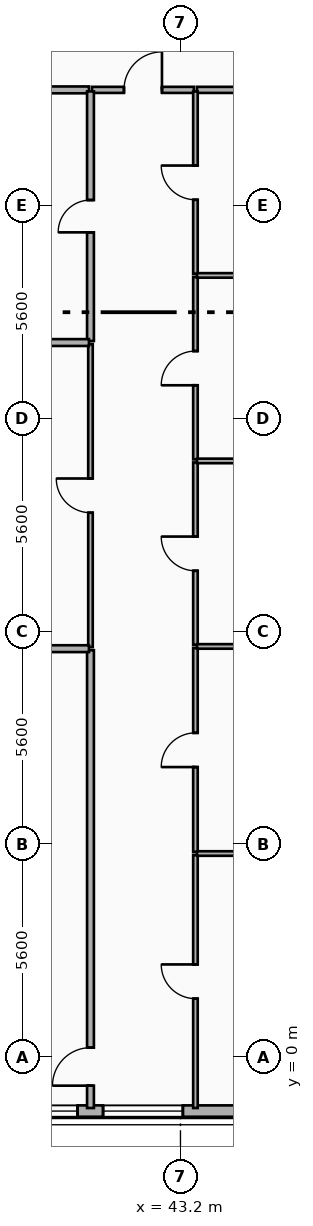
"""IFC4 building model, lengths in metres.
Left out: names, types, materials, properties, quantities, classifications, styles, units other than length and angle.
Written with IfcOpenShell. Run it as: python <this file> out.ifc"""

import sys

from ifc_helpers import new_model, si_unit, direction, frame, frame_2d, origin, place, context, subcontext, project, spatial, rectangle, extrude, element, fill, save


model = new_model("IFC4")
c1 = context("Model", 3, precision=1e-05, world=origin(), true_north=direction((0.0, 1.0)))
c2 = subcontext(c1, "Body", "Model", "MODEL_VIEW")
j1 = project(units=[si_unit("LENGTHUNIT", "METRE"), si_unit("PLANEANGLEUNIT", "RADIAN")], contexts=[c1])
p1 = place(None, origin())
s1 = spatial("IfcSite", under=j1, at=p1, CompositionType="ELEMENT")
p2 = place(p1, origin())
s2 = spatial("IfcBuilding", under=s1, at=p2, CompositionType="ELEMENT")
p3 = place(p2, frame((0.0, 0.0, 247.3)))
s3 = spatial("IfcBuildingStorey", under=s2, at=p3, CompositionType="ELEMENT", Elevation=247.3)
p4 = place(p3, frame((45.2, -1.42, 0.0), z_axis=(0.0, 0.0, 1.0), x_axis=(-1.0, 0.0, 0.0)))
e1 = element("IfcWall", 1, at=p4, inside=s3, PredefinedType="SOLIDWALL", context=c2, shape_type="SweptSolid", body=[
    extrude(rectangle(XDim=32.8, YDim=0.3, at=frame_2d((16.4, 0.0))), origin(), (0.0, 0.0, 1.0), 3.42),
])
p5 = place(p4, frame((29.071, 0.0, 0.75)))
e2 = element("IfcOpeningElement", 2, at=p5, cuts=e1, PredefinedType="OPENING", context=c2, shape_type="SweptSolid", body=[
    extrude(rectangle(XDim=2.1, YDim=2.1, at=frame_2d((1.05, 1.05))), frame((0.0, 0.16, 0.0), z_axis=(0.0, -1.0, 0.0), x_axis=(1.0, 0.0, 0.0)), (0.0, 0.0, 1.0), 0.32),
])
p6 = place(p4, frame((26.745, 0.0, 0.75)))
e3 = element("IfcOpeningElement", 3, at=p6, cuts=e1, PredefinedType="OPENING", context=c2, shape_type="SweptSolid", body=[
    extrude(rectangle(XDim=1.6, YDim=1.95, at=frame_2d((0.8, 0.975))), frame((0.0, 0.16, 0.0), z_axis=(0.0, -1.0, 0.0), x_axis=(1.0, 0.0, 0.0)), (0.0, 0.0, 1.0), 0.32),
])
p7 = place(p4, frame((21.981, 0.0, 0.75)))
e4 = element("IfcOpeningElement", 4, at=p7, cuts=e1, PredefinedType="OPENING", context=c2, shape_type="SweptSolid", body=[
    extrude(rectangle(XDim=2.1, YDim=2.1, at=frame_2d((1.05, 1.05))), frame((0.0, 0.16, 0.0), z_axis=(0.0, -1.0, 0.0), x_axis=(1.0, 0.0, 0.0)), (0.0, 0.0, 1.0), 0.32),
])
p8 = place(p4, frame((18.324, 0.0, 0.75)))
e5 = element("IfcOpeningElement", 5, at=p8, cuts=e1, PredefinedType="OPENING", context=c2, shape_type="SweptSolid", body=[
    extrude(rectangle(XDim=2.1, YDim=2.1, at=frame_2d((1.05, 1.05))), frame((0.0, 0.16, 0.0), z_axis=(0.0, -1.0, 0.0), x_axis=(1.0, 0.0, 0.0)), (0.0, 0.0, 1.0), 0.32),
])
p9 = place(p4, frame((11.364, 0.0, 0.75)))
e6 = element("IfcOpeningElement", 6, at=p9, cuts=e1, PredefinedType="OPENING", context=c2, shape_type="SweptSolid", body=[
    extrude(rectangle(XDim=2.1, YDim=2.1, at=frame_2d((1.05, 1.05))), frame((0.0, 0.16, 0.0), z_axis=(0.0, -1.0, 0.0), x_axis=(1.0, 0.0, 0.0)), (0.0, 0.0, 1.0), 0.32),
])
p10 = place(p4, frame((9.238, 0.0, 0.68)))
e7 = element("IfcOpeningElement", 7, at=p10, cuts=e1, PredefinedType="OPENING", context=c2, shape_type="SweptSolid", body=[
    extrude(rectangle(XDim=1.2, YDim=1.5, at=frame_2d((0.6, 0.75))), frame((0.0, 0.16, 0.0), z_axis=(0.0, -1.0, 0.0), x_axis=(1.0, 0.0, 0.0)), (0.0, 0.0, 1.0), 0.32),
])
p11 = place(p4, frame((14.669, 0.0, 0.75)))
e8 = element("IfcOpeningElement", 8, at=p11, cuts=e1, PredefinedType="OPENING", context=c2, shape_type="SweptSolid", body=[
    extrude(rectangle(XDim=2.1, YDim=2.1, at=frame_2d((1.05, 1.05))), frame((0.0, 0.16, 0.0), z_axis=(0.0, -1.0, 0.0), x_axis=(1.0, 0.0, 0.0)), (0.0, 0.0, 1.0), 0.32),
])
p12 = place(p4, frame((1.937, 0.0, 0.75)))
e9 = element("IfcOpeningElement", 9, at=p12, cuts=e1, PredefinedType="OPENING", context=c2, shape_type="SweptSolid", body=[
    extrude(rectangle(XDim=2.1, YDim=2.1, at=frame_2d((1.05, 1.05))), frame((0.0, 0.16, 0.0), z_axis=(0.0, -1.0, 0.0), x_axis=(1.0, 0.0, 0.0)), (0.0, 0.0, 1.0), 0.32),
])
p13 = place(p4, frame((4.709, 0.0, 0.8)))
e10 = element("IfcOpeningElement", 10, at=p13, cuts=e1, PredefinedType="OPENING", context=c2, shape_type="SweptSolid", body=[
    extrude(rectangle(XDim=1.8, YDim=1.8, at=frame_2d((0.9, 0.9))), frame((0.0, 0.16, 0.0), z_axis=(0.0, -1.0, 0.0), x_axis=(1.0, 0.0, 0.0)), (0.0, 0.0, 1.0), 0.32),
])
p14 = place(p3, frame((40.872, 25.45, 0.0), z_axis=(0.0, 0.0, 1.0), x_axis=(1.0, 0.0, 0.0)))
e11 = element("IfcWall", 11, at=p14, inside=s3, PredefinedType="PARTITIONING", context=c2, shape_type="SweptSolid", body=[
    extrude(rectangle(XDim=2.682, YDim=0.16, at=frame_2d((1.341, 0.0))), origin(), (0.0, 0.0, 1.0), 3.42),
])
p15 = place(p14, frame((0.841, 0.0, 0.0)))
e12 = element("IfcOpeningElement", 12, at=p15, cuts=e11, PredefinedType="OPENING", context=c2, shape_type="SweptSolid", body=[
    extrude(rectangle(XDim=1.0, YDim=2.15, at=frame_2d((0.5, 1.075))), frame((0.0, 0.09, 0.0), z_axis=(0.0, -1.0, 0.0), x_axis=(1.0, 0.0, 0.0)), (0.0, 0.0, 1.0), 0.18),
])
p16 = place(p3, frame((38.39, 25.45, 0.0), z_axis=(0.0, 0.0, 1.0), x_axis=(1.0, 0.0, 0.0)))
e13 = element("IfcWall", 13, at=p16, inside=s3, PredefinedType="PLUMBINGWALL", context=c2, shape_type="SweptSolid", body=[
    extrude(rectangle(XDim=2.402, YDim=0.18, at=frame_2d((1.201, 0.0))), origin(), (0.0, 0.0, 1.0), 3.42),
])
p17 = place(p3, frame((43.634, 25.45, 0.0), z_axis=(0.0, 0.0, 1.0), x_axis=(1.0, 0.0, 0.0)))
e14 = element("IfcWall", 14, at=p17, inside=s3, PredefinedType="PARTITIONING", context=c2, shape_type="SweptSolid", body=[
    extrude(rectangle(XDim=5.506, YDim=0.16, at=frame_2d((2.753, 0.0))), origin(), (0.0, 0.0, 1.0), 2.7),
])
p18 = place(p3, frame((40.832, -1.34, 0.0), z_axis=(0.0, 0.0, 1.0), x_axis=(0.0, 1.0, 0.0)))
e15 = element("IfcWall", 15, at=p18, inside=s3, PredefinedType="PLUMBINGWALL", context=c2, shape_type="SweptSolid", body=[
    extrude(rectangle(XDim=12.047, YDim=0.18, at=frame_2d((6.023, 0.0))), origin(), (0.0, 0.0, 1.0), 3.05),
])
p19 = place(p18, frame((0.589, 0.0, 0.0)))
e16 = element("IfcOpeningElement", 16, at=p19, cuts=e15, PredefinedType="OPENING", context=c2, shape_type="SweptSolid", body=[
    extrude(rectangle(XDim=1.0, YDim=2.15, at=frame_2d((0.5, 1.075))), frame((0.0, 0.1, 0.0), z_axis=(0.0, -1.0, 0.0), x_axis=(1.0, 0.0, 0.0)), (0.0, 0.0, 1.0), 0.2),
])
p20 = place(p3, frame((40.832, 10.787, 0.0), z_axis=(0.0, 0.0, 1.0), x_axis=(0.0, 1.0, 0.0)))
e17 = element("IfcWall", 17, at=p20, inside=s3, PredefinedType="PARTITIONING", context=c2, shape_type="SweptSolid", body=[
    extrude(rectangle(XDim=7.975, YDim=0.12, at=frame_2d((3.987, 0.0))), origin(), (0.0, 0.0, 1.0), 2.9),
])
p21 = place(p20, frame((3.538, 0.0, 0.0)))
e18 = element("IfcOpeningElement", 18, at=p21, cuts=e17, PredefinedType="OPENING", context=c2, shape_type="SweptSolid", body=[
    extrude(rectangle(XDim=0.9, YDim=2.1, at=frame_2d((0.45, 1.05))), frame((0.0, 0.07, 0.0), z_axis=(0.0, -1.0, 0.0), x_axis=(1.0, 0.0, 0.0)), (0.0, 0.0, 1.0), 0.14),
])
p22 = place(p3, frame((40.832, 18.842, 0.0), z_axis=(0.0, 0.0, 1.0), x_axis=(0.0, 1.0, 0.0)))
e19 = element("IfcWall", 19, at=p22, inside=s3, PredefinedType="PLUMBINGWALL", context=c2, shape_type="SweptSolid", body=[
    extrude(rectangle(XDim=6.568, YDim=0.18, at=frame_2d((3.284, 0.0))), origin(), (0.0, 0.0, 1.0), 2.9),
])
p23 = place(p22, frame((2.859, 0.0, 0.0)))
e20 = element("IfcOpeningElement", 20, at=p23, cuts=e19, PredefinedType="OPENING", context=c2, shape_type="SweptSolid", body=[
    extrude(rectangle(XDim=0.85, YDim=2.1, at=frame_2d((0.425, 1.05))), frame((0.0, 0.1, 0.0), z_axis=(0.0, -1.0, 0.0), x_axis=(1.0, 0.0, 0.0)), (0.0, 0.0, 1.0), 0.2),
])
p24 = place(p3, frame((43.594, -1.34, 0.0), z_axis=(0.0, 0.0, 1.0), x_axis=(0.0, 1.0, 0.0)))
e21 = element("IfcWall", 21, at=p24, inside=s3, PredefinedType="PARTITIONING", context=c2, shape_type="SweptSolid", body=[
    extrude(rectangle(XDim=6.657, YDim=0.12, at=frame_2d((3.329, 0.0))), origin(), (0.0, 0.0, 1.0), 3.08),
])
p25 = place(p24, frame((2.878, 0.0, 0.0)))
e22 = element("IfcOpeningElement", 22, at=p25, cuts=e21, PredefinedType="OPENING", context=c2, shape_type="SweptSolid", body=[
    extrude(rectangle(XDim=0.9, YDim=2.1, at=frame_2d((0.45, 1.05))), frame((0.0, 0.07, 0.0), z_axis=(0.0, -1.0, 0.0), x_axis=(1.0, 0.0, 0.0)), (0.0, 0.0, 1.0), 0.14),
])
p26 = place(p3, frame((43.594, 5.397, 0.0), z_axis=(0.0, 0.0, 1.0), x_axis=(0.0, 1.0, 0.0)))
e23 = element("IfcWall", 23, at=p26, inside=s3, PredefinedType="PARTITIONING", context=c2, shape_type="SweptSolid", body=[
    extrude(rectangle(XDim=5.369, YDim=0.12, at=frame_2d((2.685, 0.0))), origin(), (0.0, 0.0, 1.0), 3.05),
])
p27 = place(p26, frame((2.235, 0.0, 0.0)))
e24 = element("IfcOpeningElement", 24, at=p27, cuts=e23, PredefinedType="OPENING", context=c2, shape_type="SweptSolid", body=[
    extrude(rectangle(XDim=0.9, YDim=2.1, at=frame_2d((0.45, 1.05))), frame((0.0, 0.07, 0.0), z_axis=(0.0, -1.0, 0.0), x_axis=(1.0, 0.0, 0.0)), (0.0, 0.0, 1.0), 0.14),
])
p28 = place(p3, frame((43.594, 10.846, 0.0), z_axis=(0.0, 0.0, 1.0), x_axis=(0.0, 1.0, 0.0)))
e25 = element("IfcWall", 25, at=p28, inside=s3, PredefinedType="PARTITIONING", context=c2, shape_type="SweptSolid", body=[
    extrude(rectangle(XDim=4.801, YDim=0.12, at=frame_2d((2.4, 0.0))), origin(), (0.0, 0.0, 1.0), 2.9),
])
p29 = place(p28, frame((1.95, 0.0, 0.0)))
e26 = element("IfcOpeningElement", 26, at=p29, cuts=e25, PredefinedType="OPENING", context=c2, shape_type="SweptSolid", body=[
    extrude(rectangle(XDim=0.9, YDim=2.1, at=frame_2d((0.45, 1.05))), frame((0.0, 0.07, 0.0), z_axis=(0.0, -1.0, 0.0), x_axis=(1.0, 0.0, 0.0)), (0.0, 0.0, 1.0), 0.14),
])
p30 = place(p3, frame((43.594, 15.727, 0.0), z_axis=(0.0, 0.0, 1.0), x_axis=(0.0, 1.0, 0.0)))
e27 = element("IfcWall", 27, at=p30, inside=s3, PredefinedType="PARTITIONING", context=c2, shape_type="SweptSolid", body=[
    extrude(rectangle(XDim=4.801, YDim=0.12, at=frame_2d((2.4, 0.0))), origin(), (0.0, 0.0, 1.0), 2.9),
])
p31 = place(p30, frame((1.95, 0.0, 0.0)))
e28 = element("IfcOpeningElement", 28, at=p31, cuts=e27, PredefinedType="OPENING", context=c2, shape_type="SweptSolid", body=[
    extrude(rectangle(XDim=0.9, YDim=2.1, at=frame_2d((0.45, 1.05))), frame((0.0, 0.07, 0.0), z_axis=(0.0, -1.0, 0.0), x_axis=(1.0, 0.0, 0.0)), (0.0, 0.0, 1.0), 0.14),
])
p32 = place(p3, frame((43.594, 20.608, 0.0), z_axis=(0.0, 0.0, 1.0), x_axis=(0.0, 1.0, 0.0)))
e29 = element("IfcWall", 29, at=p32, inside=s3, PredefinedType="PARTITIONING", context=c2, shape_type="SweptSolid", body=[
    extrude(rectangle(XDim=4.802, YDim=0.12, at=frame_2d((2.401, 0.0))), origin(), (0.0, 0.0, 1.0), 3.05),
])
p33 = place(p32, frame((1.951, 0.0, 0.0)))
e30 = element("IfcOpeningElement", 30, at=p33, cuts=e29, PredefinedType="OPENING", context=c2, shape_type="SweptSolid", body=[
    extrude(rectangle(XDim=0.9, YDim=2.1, at=frame_2d((0.45, 1.05))), frame((0.0, 0.07, 0.0), z_axis=(0.0, -1.0, 0.0), x_axis=(1.0, 0.0, 0.0)), (0.0, 0.0, 1.0), 0.14),
])
p34 = place(p3, frame((38.39, 10.747, 0.0), z_axis=(0.0, 0.0, 1.0), x_axis=(1.0, 0.0, 0.0)))
e31 = element("IfcWall", 31, at=p34, inside=s3, PredefinedType="PLUMBINGWALL", context=c2, shape_type="SweptSolid", body=[
    extrude(rectangle(XDim=2.402, YDim=0.18, at=frame_2d((1.201, 0.0))), origin(), (0.0, 0.0, 1.0), 3.42),
])
p35 = place(p3, frame((38.39, 18.802, 0.0), z_axis=(0.0, 0.0, 1.0), x_axis=(1.0, 0.0, 0.0)))
e32 = element("IfcWall", 32, at=p35, inside=s3, PredefinedType="PLUMBINGWALL", context=c2, shape_type="SweptSolid", body=[
    extrude(rectangle(XDim=2.402, YDim=0.18, at=frame_2d((1.201, 0.0))), origin(), (0.0, 0.0, 1.0), 2.9),
])
for number, where, z_axis, x_axis in (
    (33, (43.634, 5.357, 0.0), (0.0, 0.0, 1.0), (1.0, 0.0, 0.0)),
    (34, (43.634, 10.806, 0.0), (0.0, 0.0, 1.0), (1.0, 0.0, 0.0)),
    (35, (43.634, 15.687, 0.0), (0.0, 0.0, 1.0), (1.0, 0.0, 0.0)),
    (36, (43.634, 20.568, 0.0), (0.0, 0.0, 1.0), (1.0, 0.0, 0.0)),
):
    element("IfcWall", number, at=place(p3, frame(where, z_axis=z_axis, x_axis=x_axis)), inside=s3, PredefinedType="PARTITIONING", context=c2, shape_type="SweptSolid", body=[
        extrude(rectangle(XDim=5.506, YDim=0.12, at=frame_2d((2.753, 0.0))), origin(), (0.0, 0.0, 1.0), 2.7),
    ])
p36 = place(p12, origin())
e37 = element("IfcWindow", 37, at=p36, inside=s3, PartitioningType="SINGLE_PANEL", PredefinedType="WINDOW", context=c2, shape_type="SweptSolid", body=[
    extrude(rectangle(XDim=2.1, YDim=2.1, at=frame_2d((1.05, 1.05))), frame((0.0, 0.03, 0.0), z_axis=(0.0, -1.0, 0.0), x_axis=(1.0, 0.0, 0.0)), (0.0, 0.0, 1.0), 0.06),
])
fill(e9, e37)
p37 = place(p13, origin())
e38 = element("IfcWindow", 38, at=p37, inside=s3, PartitioningType="SINGLE_PANEL", PredefinedType="WINDOW", context=c2, shape_type="SweptSolid", body=[
    extrude(rectangle(XDim=1.8, YDim=1.8, at=frame_2d((0.9, 0.9))), frame((0.0, 0.03, 0.0), z_axis=(0.0, -1.0, 0.0), x_axis=(1.0, 0.0, 0.0)), (0.0, 0.0, 1.0), 0.06),
])
fill(e10, e38)
p38 = place(p15, origin())
e39 = element("IfcDoor", 39, at=p38, inside=s3, OperationType="SINGLE_SWING_RIGHT", PredefinedType="DOOR", context=c2, shape_type="SweptSolid", body=[
    extrude(rectangle(XDim=1.0, YDim=2.15, at=frame_2d((0.5, 1.075))), frame((0.0, 0.025, 0.0), z_axis=(0.0, -1.0, 0.0), x_axis=(1.0, 0.0, 0.0)), (0.0, 0.0, 1.0), 0.05),
])
fill(e12, e39)
p39 = place(p19, origin())
e40 = element("IfcDoor", 40, at=p39, inside=s3, OperationType="SINGLE_SWING_LEFT", PredefinedType="DOOR", context=c2, shape_type="SweptSolid", body=[
    extrude(rectangle(XDim=1.0, YDim=2.15, at=frame_2d((0.5, 1.075))), frame((0.0, 0.025, 0.0), z_axis=(0.0, -1.0, 0.0), x_axis=(1.0, 0.0, 0.0)), (0.0, 0.0, 1.0), 0.05),
])
fill(e16, e40)
p40 = place(p21, origin())
e41 = element("IfcDoor", 41, at=p40, inside=s3, OperationType="SINGLE_SWING_RIGHT", PredefinedType="DOOR", context=c2, shape_type="SweptSolid", body=[
    extrude(rectangle(XDim=0.9, YDim=2.1, at=frame_2d((0.45, 1.05))), frame((0.0, 0.025, 0.0), z_axis=(0.0, -1.0, 0.0), x_axis=(1.0, 0.0, 0.0)), (0.0, 0.0, 1.0), 0.05),
])
fill(e18, e41)
p41 = place(p23, origin())
e42 = element("IfcDoor", 42, at=p41, inside=s3, OperationType="SINGLE_SWING_LEFT", PredefinedType="DOOR", context=c2, shape_type="SweptSolid", body=[
    extrude(rectangle(XDim=0.85, YDim=2.1, at=frame_2d((0.425, 1.05))), frame((0.0, 0.025, 0.0), z_axis=(0.0, -1.0, 0.0), x_axis=(1.0, 0.0, 0.0)), (0.0, 0.0, 1.0), 0.05),
])
fill(e20, e42)
p42 = place(p25, origin())
e43 = element("IfcDoor", 43, at=p42, inside=s3, OperationType="SINGLE_SWING_RIGHT", PredefinedType="DOOR", context=c2, shape_type="SweptSolid", body=[
    extrude(rectangle(XDim=0.9, YDim=2.1, at=frame_2d((0.45, 1.05))), frame((0.0, 0.025, 0.0), z_axis=(0.0, -1.0, 0.0), x_axis=(1.0, 0.0, 0.0)), (0.0, 0.0, 1.0), 0.05),
])
fill(e22, e43)
p43 = place(p27, origin())
e44 = element("IfcDoor", 44, at=p43, inside=s3, OperationType="SINGLE_SWING_LEFT", PredefinedType="DOOR", context=c2, shape_type="SweptSolid", body=[
    extrude(rectangle(XDim=0.9, YDim=2.1, at=frame_2d((0.45, 1.05))), frame((0.0, 0.025, 0.0), z_axis=(0.0, -1.0, 0.0), x_axis=(1.0, 0.0, 0.0)), (0.0, 0.0, 1.0), 0.05),
])
fill(e24, e44)
p44 = place(p29, origin())
e45 = element("IfcDoor", 45, at=p44, inside=s3, OperationType="SINGLE_SWING_RIGHT", PredefinedType="DOOR", context=c2, shape_type="SweptSolid", body=[
    extrude(rectangle(XDim=0.9, YDim=2.1, at=frame_2d((0.45, 1.05))), frame((0.0, 0.025, 0.0), z_axis=(0.0, -1.0, 0.0), x_axis=(1.0, 0.0, 0.0)), (0.0, 0.0, 1.0), 0.05),
])
fill(e26, e45)
p45 = place(p31, origin())
e46 = element("IfcDoor", 46, at=p45, inside=s3, OperationType="SINGLE_SWING_LEFT", PredefinedType="DOOR", context=c2, shape_type="SweptSolid", body=[
    extrude(rectangle(XDim=0.9, YDim=2.1, at=frame_2d((0.45, 1.05))), frame((0.0, 0.025, 0.0), z_axis=(0.0, -1.0, 0.0), x_axis=(1.0, 0.0, 0.0)), (0.0, 0.0, 1.0), 0.05),
])
fill(e28, e46)
p46 = place(p33, origin())
e47 = element("IfcDoor", 47, at=p46, inside=s3, OperationType="SINGLE_SWING_RIGHT", PredefinedType="DOOR", context=c2, shape_type="SweptSolid", body=[
    extrude(rectangle(XDim=0.9, YDim=2.1, at=frame_2d((0.45, 1.05))), frame((0.0, 0.025, 0.0), z_axis=(0.0, -1.0, 0.0), x_axis=(1.0, 0.0, 0.0)), (0.0, 0.0, 1.0), 0.05),
])
fill(e30, e47)
save(model, sys.argv[1])
